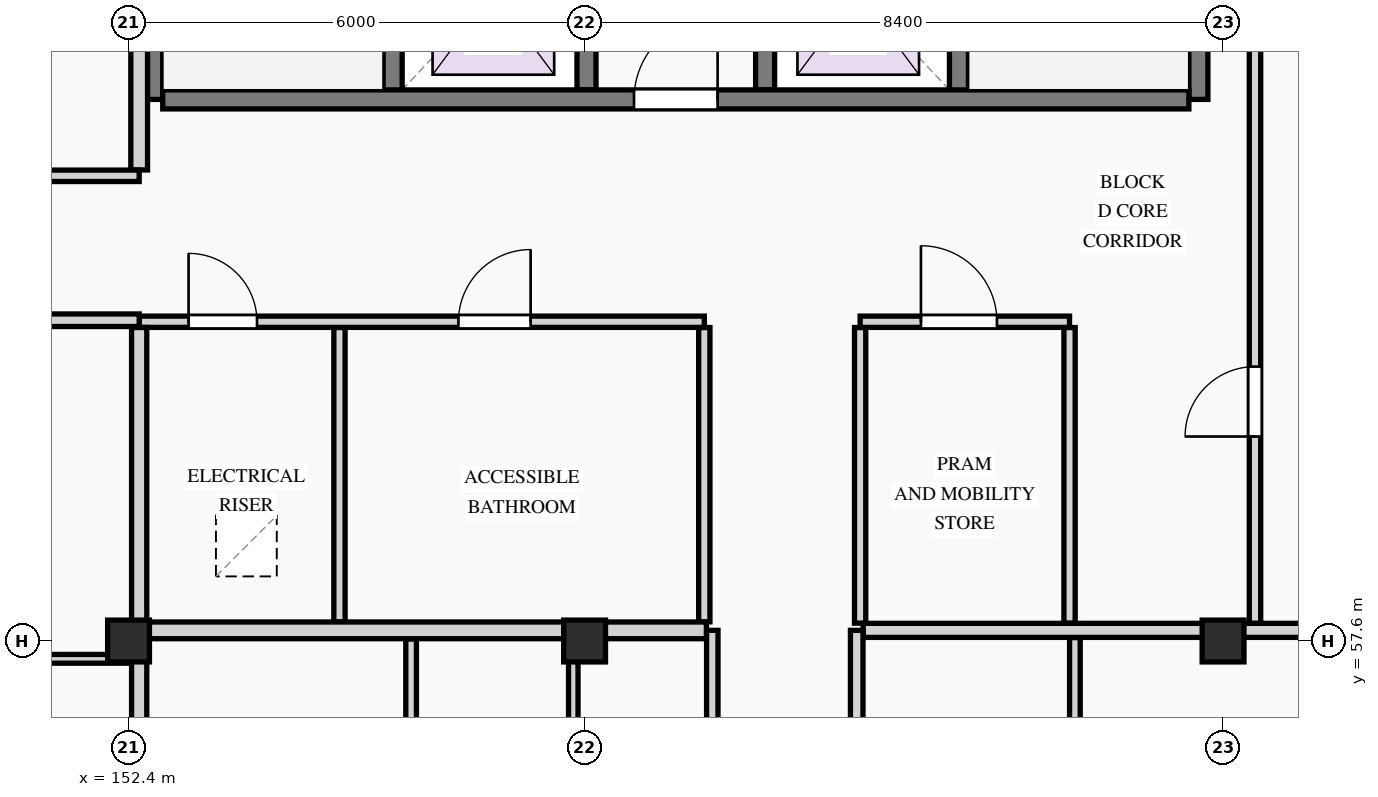
"""IFC4 building model, lengths in metres.
Left out: names, types, materials, properties, quantities, classifications, styles, units other than length and angle.
Written with IfcOpenShell. Run it as: python <this file> out.ifc"""

import sys

from ifc_helpers import new_model, si_unit, direction, frame, frame_2d, origin, origin_2d, place, context, subcontext, project, spatial, rectangle, extrude, element, fill, save


model = new_model("IFC4")
c1 = context("Model", 3, precision=1e-05, world=origin(), true_north=direction((0.0, 1.0)))
c2 = subcontext(c1, "Body", "Model", "MODEL_VIEW")
j1 = project(units=[si_unit("LENGTHUNIT", "METRE"), si_unit("PLANEANGLEUNIT", "RADIAN")], contexts=[c1])
p1 = place(None, origin())
s1 = spatial("IfcSite", under=j1, at=p1, CompositionType="ELEMENT")
p2 = place(p1, origin())
s2 = spatial("IfcBuilding", under=s1, at=p2, CompositionType="ELEMENT")
p3 = place(p2, frame((0.0, 0.0, 14.7)))
s3 = spatial("IfcBuildingStorey", under=s2, at=p3, CompositionType="ELEMENT", Elevation=14.7)
for number, where, z_axis, x_axis in (
    (1, (152.4, 57.6, 0.0), (0.0, 0.0, 1.0), (1.0, 0.0, 0.0)),
    (2, (158.4, 57.6, 0.0), (0.0, 0.0, 1.0), (1.0, 0.0, 0.0)),
    (3, (166.8, 57.6, 0.0), (0.0, 0.0, 1.0), (1.0, 0.0, 0.0)),
):
    element("IfcColumn", number, at=place(p3, frame(where, z_axis=z_axis, x_axis=x_axis)), inside=s3, PredefinedType="COLUMN", context=c2, shape_type="SweptSolid", body=[
        extrude(rectangle(XDim=0.55, YDim=0.55, at=origin_2d()), origin(), (0.0, 0.0, 1.0), 3.3),
    ])
p4 = place(p3, frame((155.875, 71.65, 0.0), z_axis=(0.0, 0.0, 1.0), x_axis=(0.0, -1.0, 0.0)))
e4 = element("IfcWall", 4, at=p4, inside=s3, PredefinedType="SHEAR", context=c2, shape_type="SweptSolid", body=[
    extrude(rectangle(XDim=6.925, YDim=0.25, at=frame_2d((3.462, 0.0))), origin(), (0.0, 0.0, 1.0), 3.0),
])
p5 = place(p4, frame((0.35, 0.0, 0.0)))
e5 = element("IfcOpeningElement", 5, at=p5, cuts=e4, PredefinedType="OPENING", context=c2, shape_type="SweptSolid", body=[
    extrude(rectangle(XDim=0.95, YDim=2.1, at=frame_2d((0.475, 1.05))), frame((0.0, 0.135, 0.0), z_axis=(0.0, -1.0, 0.0), x_axis=(1.0, 0.0, 0.0)), (0.0, 0.0, 1.0), 0.27),
])
p6 = place(p3, frame((152.725, 71.8, 0.0), z_axis=(0.0, 0.0, 1.0), x_axis=(0.0, -1.0, 0.0)))
e6 = element("IfcWall", 6, at=p6, inside=s3, PredefinedType="SHEAR", context=c2, shape_type="SweptSolid", body=[
    extrude(rectangle(XDim=7.075, YDim=0.25, at=frame_2d((3.538, 0.0))), origin(), (0.0, 0.0, 1.0), 3.0),
])
p7 = place(p3, frame((166.475, 71.65, 0.0), z_axis=(0.0, 0.0, 1.0), x_axis=(0.0, -1.0, 0.0)))
e7 = element("IfcWall", 7, at=p7, inside=s3, PredefinedType="SHEAR", context=c2, shape_type="SweptSolid", body=[
    extrude(rectangle(XDim=6.925, YDim=0.25, at=frame_2d((3.462, 0.0))), origin(), (0.0, 0.0, 1.0), 3.0),
])
p8 = place(p3, frame((163.325, 71.65, 0.0), z_axis=(0.0, 0.0, 1.0), x_axis=(0.0, -1.0, 0.0)))
e8 = element("IfcWall", 8, at=p8, inside=s3, PredefinedType="SHEAR", context=c2, shape_type="SweptSolid", body=[
    extrude(rectangle(XDim=6.925, YDim=0.25, at=frame_2d((3.462, 0.0))), origin(), (0.0, 0.0, 1.0), 3.0),
])
p9 = place(p8, frame((0.35, 0.0, 0.0)))
e9 = element("IfcOpeningElement", 9, at=p9, cuts=e8, PredefinedType="OPENING", context=c2, shape_type="SweptSolid", body=[
    extrude(rectangle(XDim=0.95, YDim=2.1, at=frame_2d((0.475, 1.05))), frame((0.0, 0.135, 0.0), z_axis=(0.0, -1.0, 0.0), x_axis=(1.0, 0.0, 0.0)), (0.0, 0.0, 1.0), 0.27),
])
for number, where, z_axis, x_axis in (
    (10, (158.425, 67.275, 0.0), (0.0, 0.0, 1.0), (0.0, -1.0, 0.0)),
    (11, (160.775, 67.275, 0.0), (0.0, 0.0, 1.0), (0.0, -1.0, 0.0)),
):
    element("IfcWall", number, at=place(p3, frame(where, z_axis=z_axis, x_axis=x_axis)), inside=s3, PredefinedType="SHEAR", context=c2, shape_type="SweptSolid", body=[
        extrude(rectangle(XDim=2.425, YDim=0.25, at=frame_2d((1.212, 0.0))), origin(), (0.0, 0.0, 1.0), 3.0),
    ])
p10 = place(p3, frame((152.85, 64.725, 0.0), z_axis=(0.0, 0.0, 1.0), x_axis=(1.0, 0.0, 0.0)))
e12 = element("IfcWall", 12, at=p10, inside=s3, PredefinedType="SHEAR", context=c2, shape_type="SweptSolid", body=[
    extrude(rectangle(XDim=13.5, YDim=0.25, at=frame_2d((6.75, 0.0))), origin(), (0.0, 0.0, 1.0), 3.0),
])
p11 = place(p10, frame((6.2, 0.0, 0.0)))
e13 = element("IfcOpeningElement", 13, at=p11, cuts=e12, PredefinedType="OPENING", context=c2, shape_type="SweptSolid", body=[
    extrude(rectangle(XDim=1.1, YDim=2.15, at=frame_2d((0.55, 1.075))), frame((0.0, 0.135, 0.0), z_axis=(0.0, -1.0, 0.0), x_axis=(1.0, 0.0, 0.0)), (0.0, 0.0, 1.0), 0.27),
])
for number, where, z_axis, x_axis in (
    (14, (155.175, 61.724, 0.0), (0.0, 0.0, 1.0), (0.0, -1.0, 0.0)),
    (15, (159.975, 61.724, 0.0), (0.0, 0.0, 1.0), (0.0, -1.0, 0.0)),
):
    element("IfcWall", number, at=place(p3, frame(where, z_axis=z_axis, x_axis=x_axis)), inside=s3, PredefinedType="PARTITIONING", context=c2, shape_type="SweptSolid", body=[
        extrude(rectangle(XDim=3.872, YDim=0.148, at=frame_2d((1.936, 0.0))), origin(), (0.0, 0.0, 1.0), 3.0),
    ])
for number, where, z_axis, x_axis in (
    (16, (162.025, 61.724, 0.0), (0.0, 0.0, 1.0), (0.0, -1.0, 0.0)),
    (17, (164.78, 61.724, 0.0), (0.0, 0.0, 1.0), (0.0, -1.0, 0.0)),
):
    element("IfcWall", number, at=place(p3, frame(where, z_axis=z_axis, x_axis=x_axis)), inside=s3, PredefinedType="PARTITIONING", context=c2, shape_type="SweptSolid", body=[
        extrude(rectangle(XDim=3.89, YDim=0.148, at=frame_2d((1.945, 0.0))), origin(), (0.0, 0.0, 1.0), 3.0),
    ])
p12 = place(p3, frame((152.54, 61.8, 0.0), z_axis=(0.0, 0.0, 1.0), x_axis=(1.0, 0.0, 0.0)))
e18 = element("IfcWall", 18, at=p12, inside=s3, PredefinedType="PARTITIONING", context=c2, shape_type="SweptSolid", body=[
    extrude(rectangle(XDim=7.435, YDim=0.148, at=frame_2d((3.718, 0.0))), origin(), (0.0, 0.0, 1.0), 3.0),
])
p13 = place(p12, frame((0.65, 0.0, 0.0)))
e19 = element("IfcOpeningElement", 19, at=p13, cuts=e18, PredefinedType="OPENING", context=c2, shape_type="SweptSolid", body=[
    extrude(rectangle(XDim=0.9, YDim=2.1, at=frame_2d((0.45, 1.05))), frame((0.0, 0.084, 0.0), z_axis=(0.0, -1.0, 0.0), x_axis=(1.0, 0.0, 0.0)), (0.0, 0.0, 1.0), 0.168),
])
p14 = place(p12, frame((4.2, 0.0, 0.0)))
e20 = element("IfcOpeningElement", 20, at=p14, cuts=e18, PredefinedType="OPENING", context=c2, shape_type="SweptSolid", body=[
    extrude(rectangle(XDim=0.95, YDim=2.1, at=frame_2d((0.475, 1.05))), frame((0.0, 0.084, 0.0), z_axis=(0.0, -1.0, 0.0), x_axis=(1.0, 0.0, 0.0)), (0.0, 0.0, 1.0), 0.168),
])
p15 = place(p3, frame((162.025, 61.8, 0.0), z_axis=(0.0, 0.0, 1.0), x_axis=(1.0, 0.0, 0.0)))
e21 = element("IfcWall", 21, at=p15, inside=s3, PredefinedType="PARTITIONING", context=c2, shape_type="SweptSolid", body=[
    extrude(rectangle(XDim=2.755, YDim=0.148, at=frame_2d((1.377, 0.0))), origin(), (0.0, 0.0, 1.0), 3.0),
])
p16 = place(p15, frame((0.8, 0.0, 0.0)))
e22 = element("IfcOpeningElement", 22, at=p16, cuts=e21, PredefinedType="OPENING", context=c2, shape_type="SweptSolid", body=[
    extrude(rectangle(XDim=1.0, YDim=2.15, at=frame_2d((0.5, 1.075))), frame((0.0, 0.084, 0.0), z_axis=(0.0, -1.0, 0.0), x_axis=(1.0, 0.0, 0.0)), (0.0, 0.0, 1.0), 0.168),
])
p17 = place(p3, frame((156.118, 53.857, 0.0), z_axis=(0.0, 0.0, 1.0), x_axis=(0.0, 1.0, 0.0)))
e23 = element("IfcWall", 23, at=p17, inside=s3, PredefinedType="PARTITIONING", context=c2, shape_type="SweptSolid", body=[
    extrude(rectangle(XDim=3.771, YDim=0.14, at=frame_2d((1.885, 0.0))), origin(), (0.0, 0.0, 1.0), 3.0),
])
p18 = place(p3, frame((158.251, 53.857, 0.0), z_axis=(0.0, 0.0, 1.0), x_axis=(0.0, 1.0, 0.0)))
e24 = element("IfcWall", 24, at=p18, inside=s3, PredefinedType="PARTITIONING", context=c2, shape_type="SweptSolid", body=[
    extrude(rectangle(XDim=3.771, YDim=0.125, at=frame_2d((1.885, 0.0))), origin(), (0.0, 0.0, 1.0), 2.575),
])
p19 = place(p3, frame((164.85, 53.707, 0.0), z_axis=(0.0, 0.0, 1.0), x_axis=(0.0, 1.0, 0.0)))
e25 = element("IfcWall", 25, at=p19, inside=s3, PredefinedType="PARTITIONING", context=c2, shape_type="SweptSolid", body=[
    extrude(rectangle(XDim=3.938, YDim=0.14, at=frame_2d((1.969, 0.0))), origin(), (0.0, 0.0, 1.0), 3.0),
])
p20 = place(p3, frame((152.642, 57.74, 0.0), z_axis=(0.0, 0.0, 1.0), x_axis=(1.0, 0.0, 0.0)))
e26 = element("IfcWall", 26, at=p20, inside=s3, PredefinedType="PARTITIONING", context=c2, shape_type="SweptSolid", body=[
    extrude(rectangle(XDim=7.361, YDim=0.22, at=frame_2d((3.68, 0.0))), origin(), (0.0, 0.0, 1.0), 2.375),
])
p21 = place(p3, frame((162.064, 57.74, 0.0), z_axis=(0.0, 0.0, 1.0), x_axis=(1.0, 0.0, 0.0)))
e27 = element("IfcWall", 27, at=p21, inside=s3, PredefinedType="PARTITIONING", context=c2, shape_type="SweptSolid", body=[
    extrude(rectangle(XDim=11.781, YDim=0.185, at=frame_2d((5.891, 0.0))), origin(), (0.0, 0.0, 1.0), 2.375),
])
p22 = place(p3, frame((160.08, 37.354, 0.0), z_axis=(0.0, 0.0, 1.0), x_axis=(0.0, 1.0, 0.0)))
e28 = element("IfcWall", 28, at=p22, inside=s3, PredefinedType="PARTITIONING", context=c2, shape_type="SweptSolid", body=[
    extrude(rectangle(XDim=20.385, YDim=0.15, at=frame_2d((10.193, 0.0))), origin(), (0.0, 0.0, 1.0), 3.0),
])
p23 = place(p22, frame((2.302, 0.0, 0.0)))
e29 = element("IfcOpeningElement", 29, at=p23, cuts=e28, PredefinedType="OPENING", context=c2, shape_type="SweptSolid", body=[
    extrude(rectangle(XDim=0.92, YDim=2.1, at=frame_2d((0.46, 1.05))), frame((0.0, 0.085, 0.0), z_axis=(0.0, -1.0, 0.0), x_axis=(1.0, 0.0, 0.0)), (0.0, 0.0, 1.0), 0.17),
])
p24 = place(p22, frame((15.24, 0.0, 0.0)))
e30 = element("IfcOpeningElement", 30, at=p24, cuts=e28, PredefinedType="OPENING", context=c2, shape_type="SweptSolid", body=[
    extrude(rectangle(XDim=0.92, YDim=2.1, at=frame_2d((0.46, 1.05))), frame((0.0, 0.085, 0.0), z_axis=(0.0, -1.0, 0.0), x_axis=(1.0, 0.0, 0.0)), (0.0, 0.0, 1.0), 0.17),
])
p25 = place(p3, frame((161.98, 37.354, 0.0), z_axis=(0.0, 0.0, 1.0), x_axis=(0.0, 1.0, 0.0)))
e31 = element("IfcWall", 31, at=p25, inside=s3, PredefinedType="PARTITIONING", context=c2, shape_type="SweptSolid", body=[
    extrude(rectangle(XDim=20.385, YDim=0.165, at=frame_2d((10.193, 0.0))), origin(), (0.0, 0.0, 1.0), 3.0),
])
p26 = place(p25, frame((2.319, 0.0, 0.0)))
e32 = element("IfcOpeningElement", 32, at=p26, cuts=e31, PredefinedType="OPENING", context=c2, shape_type="SweptSolid", body=[
    extrude(rectangle(XDim=0.92, YDim=2.1, at=frame_2d((0.46, 1.05))), frame((0.0, 0.093, 0.0), z_axis=(0.0, -1.0, 0.0), x_axis=(1.0, 0.0, 0.0)), (0.0, 0.0, 1.0), 0.185),
])
p27 = place(p25, frame((15.083, 0.0, 0.0)))
e33 = element("IfcOpeningElement", 33, at=p27, cuts=e31, PredefinedType="OPENING", context=c2, shape_type="SweptSolid", body=[
    extrude(rectangle(XDim=0.96, YDim=2.12, at=frame_2d((0.48, 1.06))), frame((0.0, 0.093, 0.0), z_axis=(0.0, -1.0, 0.0), x_axis=(1.0, 0.0, 0.0)), (0.0, 0.0, 1.0), 0.185),
])
p28 = place(p3, frame((167.22, 57.834, 0.0), z_axis=(0.0, 0.0, 1.0), x_axis=(0.0, 1.0, 0.0)))
e34 = element("IfcWall", 34, at=p28, inside=s3, PredefinedType="PARTITIONING", context=c2, shape_type="SweptSolid", body=[
    extrude(rectangle(XDim=14.026, YDim=0.15, at=frame_2d((7.013, 0.0))), origin(), (0.0, 0.0, 1.0), 2.425),
])
p29 = place(p28, frame((2.456, 0.0, 0.0)))
e35 = element("IfcOpeningElement", 35, at=p29, cuts=e34, PredefinedType="OPENING", context=c2, shape_type="SweptSolid", body=[
    extrude(rectangle(XDim=0.92, YDim=2.1, at=frame_2d((0.46, 1.05))), frame((0.0, 0.085, 0.0), z_axis=(0.0, -1.0, 0.0), x_axis=(1.0, 0.0, 0.0)), (0.0, 0.0, 1.0), 0.17),
])
p30 = place(p3, frame((145.872, 57.365, 0.0), z_axis=(0.0, 0.0, 1.0), x_axis=(1.0, 0.0, 0.0)))
e36 = element("IfcWall", 36, at=p30, inside=s3, PredefinedType="PARTITIONING", context=c2, shape_type="SweptSolid", body=[
    extrude(rectangle(XDim=6.566, YDim=0.115, at=frame_2d((3.283, 0.0))), origin(), (0.0, 0.0, 1.0), 2.375),
])
p31 = place(p3, frame((152.54, 43.26, 0.0), z_axis=(0.0, 0.0, 1.0), x_axis=(0.0, 1.0, 0.0)))
e37 = element("IfcWall", 37, at=p31, inside=s3, PredefinedType="PARTITIONING", context=c2, shape_type="SweptSolid", body=[
    extrude(rectangle(XDim=18.464, YDim=0.2, at=frame_2d((9.232, 0.0))), origin(), (0.0, 0.0, 1.0), 2.425),
])
p32 = place(p3, frame((152.54, 63.797, 0.0), z_axis=(0.0, 0.0, 1.0), x_axis=(0.0, 1.0, 0.0)))
e38 = element("IfcWall", 38, at=p32, inside=s3, PredefinedType="PARTITIONING", context=c2, shape_type="SweptSolid", body=[
    extrude(rectangle(XDim=8.048, YDim=0.22, at=frame_2d((4.024, 0.0))), origin(), (0.0, 0.0, 1.0), 2.425),
])
p33 = place(p3, frame((138.155, 61.82, 0.0), z_axis=(0.0, 0.0, 1.0), x_axis=(1.0, 0.0, 0.0)))
e39 = element("IfcWall", 39, at=p33, inside=s3, PredefinedType="PARTITIONING", context=c2, shape_type="SweptSolid", body=[
    extrude(rectangle(XDim=14.385, YDim=0.165, at=frame_2d((7.193, 0.0))), origin(), (0.0, 0.0, 1.0), 3.0),
])
p34 = place(p33, frame((2.314, 0.0, 0.0)))
e40 = element("IfcOpeningElement", 40, at=p34, cuts=e39, PredefinedType="OPENING", context=c2, shape_type="SweptSolid", body=[
    extrude(rectangle(XDim=0.92, YDim=2.1, at=frame_2d((0.46, 1.05))), frame((0.0, 0.093, 0.0), z_axis=(0.0, -1.0, 0.0), x_axis=(1.0, 0.0, 0.0)), (0.0, 0.0, 1.0), 0.185),
])
p35 = place(p3, frame((138.155, 63.72, 0.0), z_axis=(0.0, 0.0, 1.0), x_axis=(1.0, 0.0, 0.0)))
e41 = element("IfcWall", 41, at=p35, inside=s3, PredefinedType="PARTITIONING", context=c2, shape_type="SweptSolid", body=[
    extrude(rectangle(XDim=14.385, YDim=0.15, at=frame_2d((7.193, 0.0))), origin(), (0.0, 0.0, 1.0), 3.0),
])
p36 = place(p35, frame((2.318, 0.0, 0.0)))
e42 = element("IfcOpeningElement", 42, at=p36, cuts=e41, PredefinedType="OPENING", context=c2, shape_type="SweptSolid", body=[
    extrude(rectangle(XDim=0.92, YDim=2.1, at=frame_2d((0.46, 1.05))), frame((0.0, 0.085, 0.0), z_axis=(0.0, -1.0, 0.0), x_axis=(1.0, 0.0, 0.0)), (0.0, 0.0, 1.0), 0.17),
])
p37 = place(p11, origin())
e43 = element("IfcDoor", 43, at=p37, inside=s3, OperationType="SINGLE_SWING_RIGHT", PredefinedType="DOOR", context=c2, shape_type="SweptSolid", body=[
    extrude(rectangle(XDim=1.1, YDim=2.15, at=frame_2d((0.55, 1.075))), frame((0.0, 0.025, 0.0), z_axis=(0.0, -1.0, 0.0), x_axis=(1.0, 0.0, 0.0)), (0.0, 0.0, 1.0), 0.05),
])
fill(e13, e43)
p38 = place(p13, origin())
e44 = element("IfcDoor", 44, at=p38, inside=s3, OperationType="SINGLE_SWING_LEFT", PredefinedType="DOOR", context=c2, shape_type="SweptSolid", body=[
    extrude(rectangle(XDim=0.9, YDim=2.1, at=frame_2d((0.45, 1.05))), frame((0.0, 0.025, 0.0), z_axis=(0.0, -1.0, 0.0), x_axis=(1.0, 0.0, 0.0)), (0.0, 0.0, 1.0), 0.05),
])
fill(e19, e44)
p39 = place(p14, origin())
e45 = element("IfcDoor", 45, at=p39, inside=s3, OperationType="SINGLE_SWING_RIGHT", PredefinedType="DOOR", context=c2, shape_type="SweptSolid", body=[
    extrude(rectangle(XDim=0.95, YDim=2.1, at=frame_2d((0.475, 1.05))), frame((0.0, 0.025, 0.0), z_axis=(0.0, -1.0, 0.0), x_axis=(1.0, 0.0, 0.0)), (0.0, 0.0, 1.0), 0.05),
])
fill(e20, e45)
p40 = place(p16, origin())
e46 = element("IfcDoor", 46, at=p40, inside=s3, OperationType="SINGLE_SWING_LEFT", PredefinedType="DOOR", context=c2, shape_type="SweptSolid", body=[
    extrude(rectangle(XDim=1.0, YDim=2.15, at=frame_2d((0.5, 1.075))), frame((0.0, 0.025, 0.0), z_axis=(0.0, -1.0, 0.0), x_axis=(1.0, 0.0, 0.0)), (0.0, 0.0, 1.0), 0.05),
])
fill(e22, e46)
p41 = place(p29, origin())
e47 = element("IfcDoor", 47, at=p41, inside=s3, OperationType="SINGLE_SWING_LEFT", PredefinedType="DOOR", context=c2, shape_type="SweptSolid", body=[
    extrude(rectangle(XDim=0.92, YDim=2.1, at=frame_2d((0.46, 1.05))), frame((0.0, 0.025, 0.0), z_axis=(0.0, -1.0, 0.0), x_axis=(1.0, 0.0, 0.0)), (0.0, 0.0, 1.0), 0.05),
])
fill(e35, e47)
save(model, sys.argv[1])
